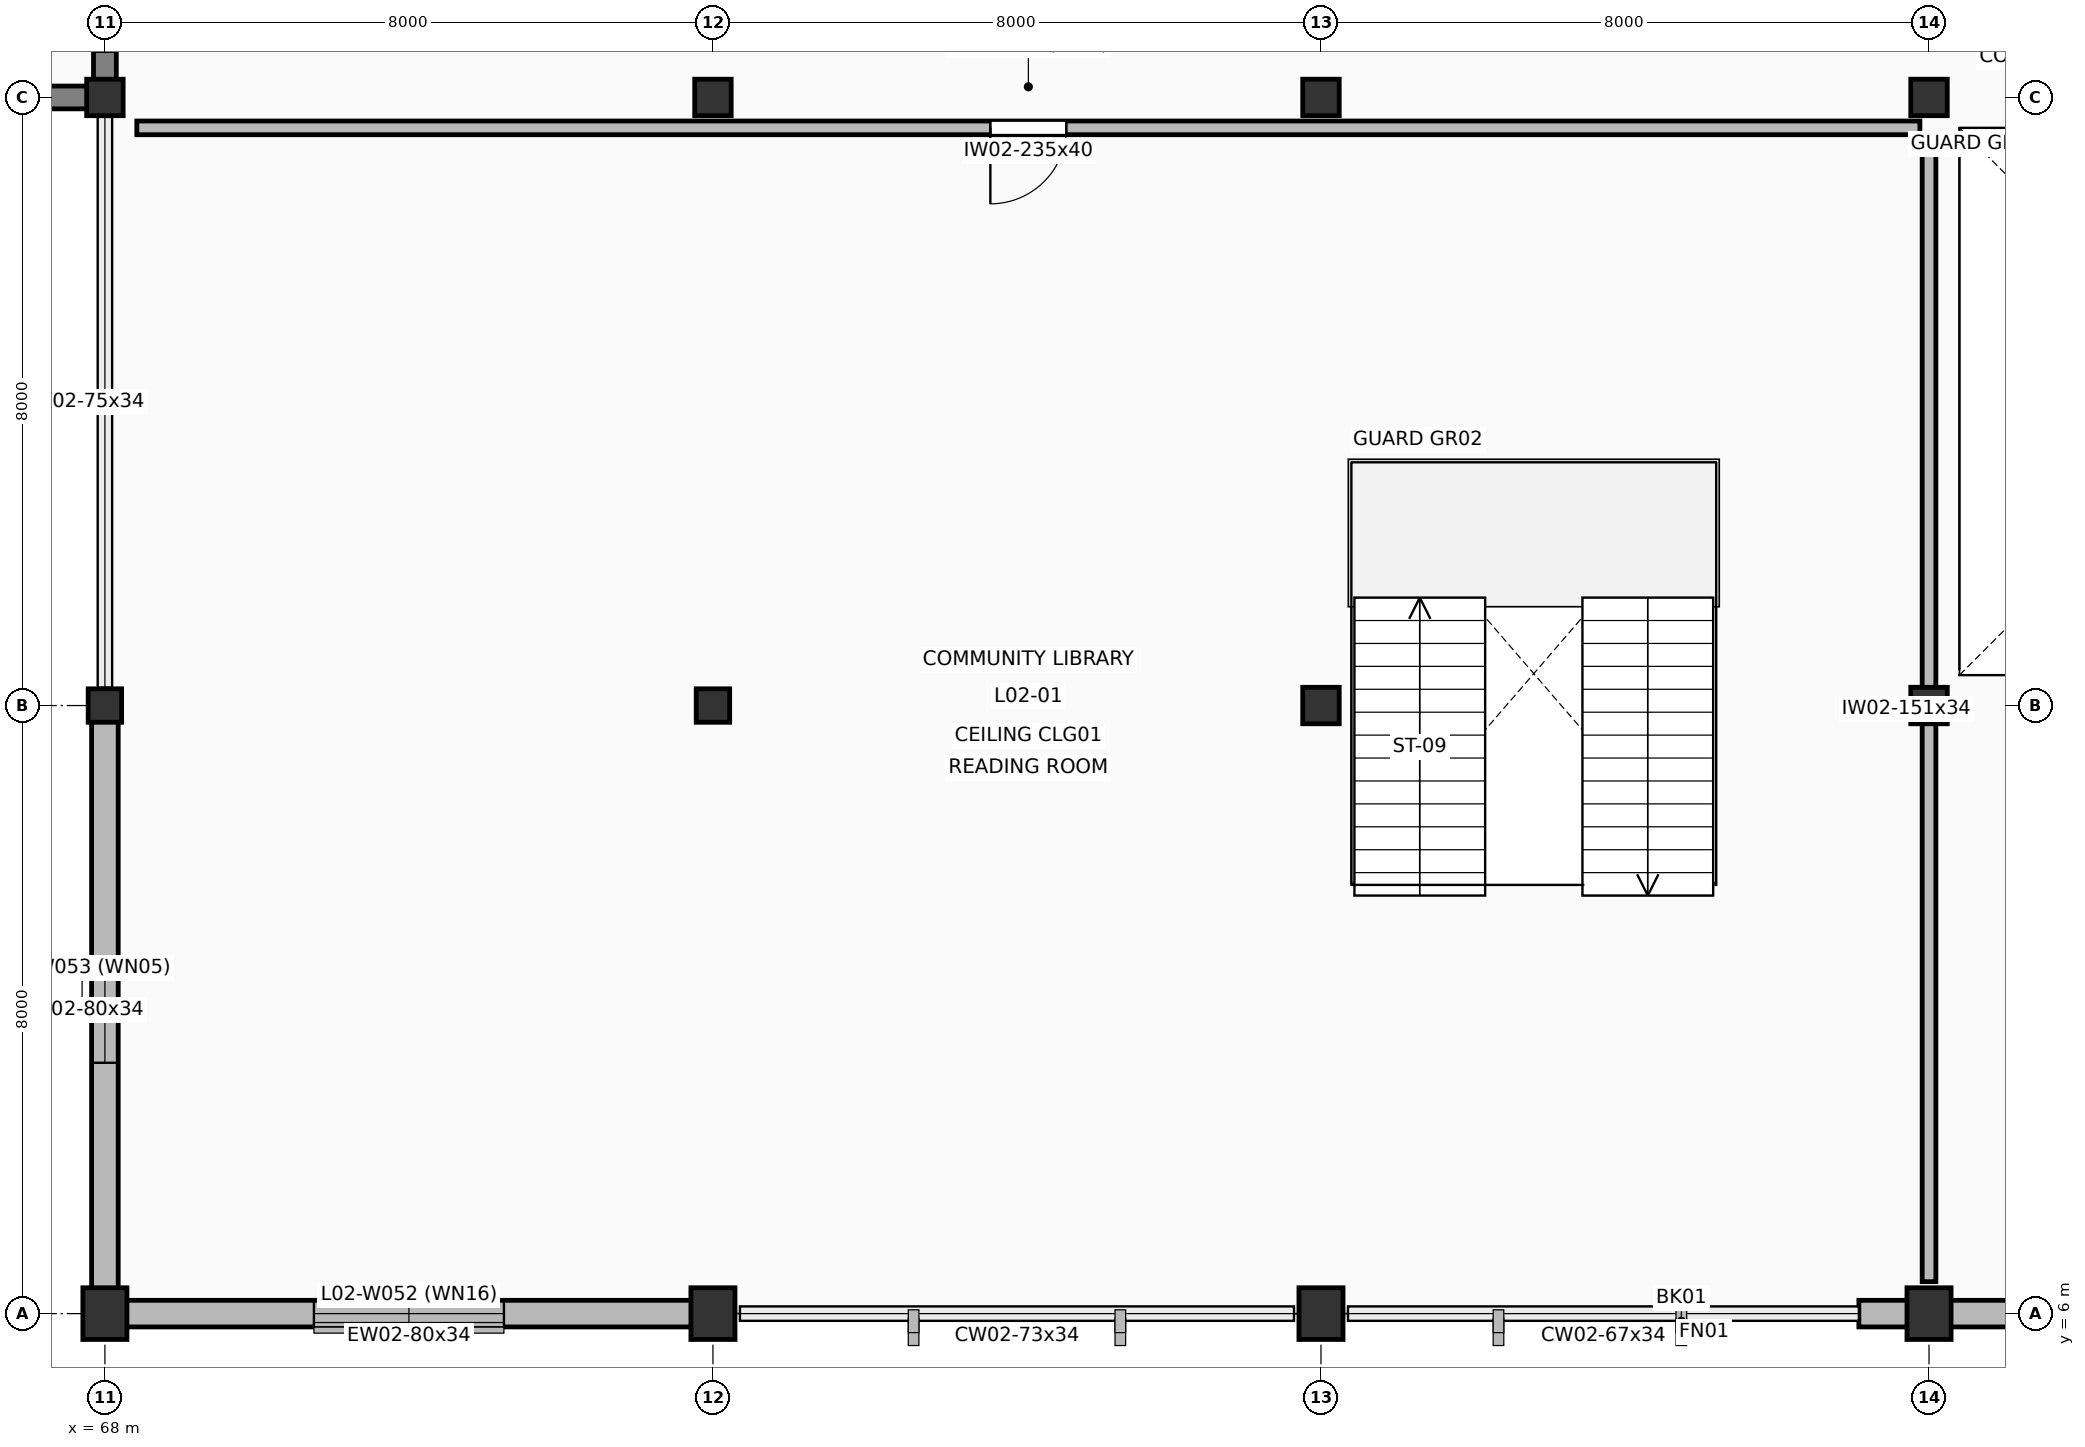
"""IFC4 building model, lengths in metres.
Left out: names, types, materials, properties, quantities, classifications, styles, units other than length and angle.
Written with IfcOpenShell. Run it as: python <this file> out.ifc"""

import sys

from ifc_helpers import new_model, si_unit, direction, frame, frame_2d, origin, origin_2d, place, context, subcontext, project, spatial, rectangle, extrude, element, fill, save


model = new_model("IFC4")
c1 = context("Model", 3, precision=1e-05, world=origin(), true_north=direction((0.0, 1.0)))
c2 = subcontext(c1, "Body", "Model", "MODEL_VIEW")
j1 = project(units=[si_unit("LENGTHUNIT", "METRE"), si_unit("PLANEANGLEUNIT", "RADIAN")], contexts=[c1])
p1 = place(None, origin())
s1 = spatial("IfcSite", under=j1, at=p1, CompositionType="ELEMENT")
p2 = place(p1, origin())
s2 = spatial("IfcBuilding", under=s1, at=p2, CompositionType="ELEMENT")
p3 = place(p2, frame((0.0, 0.0, 9.6)))
s3 = spatial("IfcBuildingStorey", under=s2, at=p3, CompositionType="ELEMENT", Elevation=9.6)
p4 = place(p3, frame((68.0, 6.0, 0.0), z_axis=(0.0, 0.0, 1.0), x_axis=(1.0, 0.0, 0.0)))
e1 = element("IfcColumn", 1, at=p4, inside=s3, PredefinedType="PILASTER", context=c2, shape_type="SweptSolid", body=[
    extrude(rectangle(XDim=0.58, YDim=0.68, at=origin_2d()), origin(), (0.0, 0.0, 1.0), 4.2),
])
p5 = place(p3, frame((68.0, 14.0, 0.0), z_axis=(0.0, 0.0, 1.0), x_axis=(1.0, 0.0, 0.0)))
e2 = element("IfcColumn", 2, at=p5, inside=s3, PredefinedType="COLUMN", context=c2, shape_type="SweptSolid", body=[
    extrude(rectangle(XDim=0.44, YDim=0.44, at=origin_2d()), origin(), (0.0, 0.0, 1.0), 4.2),
])
p6 = place(p3, frame((68.0, 22.0, 0.0), z_axis=(0.0, 0.0, 1.0), x_axis=(1.0, 0.0, 0.0)))
e3 = element("IfcColumn", 3, at=p6, inside=s3, PredefinedType="COLUMN", context=c2, shape_type="SweptSolid", body=[
    extrude(rectangle(XDim=0.48, YDim=0.48, at=origin_2d()), origin(), (0.0, 0.0, 1.0), 4.2),
])
p7 = place(p3, frame((76.0, 6.0, 0.0), z_axis=(0.0, 0.0, 1.0), x_axis=(1.0, 0.0, 0.0)))
e4 = element("IfcColumn", 4, at=p7, inside=s3, PredefinedType="PILASTER", context=c2, shape_type="SweptSolid", body=[
    extrude(rectangle(XDim=0.58, YDim=0.68, at=origin_2d()), origin(), (0.0, 0.0, 1.0), 4.2),
])
p8 = place(p3, frame((76.0, 14.0, 0.0), z_axis=(0.0, 0.0, 1.0), x_axis=(1.0, 0.0, 0.0)))
e5 = element("IfcColumn", 5, at=p8, inside=s3, PredefinedType="COLUMN", context=c2, shape_type="SweptSolid", body=[
    extrude(rectangle(XDim=0.44, YDim=0.44, at=origin_2d()), origin(), (0.0, 0.0, 1.0), 4.2),
])
p9 = place(p3, frame((76.0, 22.0, 0.0), z_axis=(0.0, 0.0, 1.0), x_axis=(1.0, 0.0, 0.0)))
e6 = element("IfcColumn", 6, at=p9, inside=s3, PredefinedType="COLUMN", context=c2, shape_type="SweptSolid", body=[
    extrude(rectangle(XDim=0.48, YDim=0.48, at=origin_2d()), origin(), (0.0, 0.0, 1.0), 4.2),
])
p10 = place(p3, frame((84.0, 6.0, 0.0), z_axis=(0.0, 0.0, 1.0), x_axis=(1.0, 0.0, 0.0)))
e7 = element("IfcColumn", 7, at=p10, inside=s3, PredefinedType="PILASTER", context=c2, shape_type="SweptSolid", body=[
    extrude(rectangle(XDim=0.58, YDim=0.68, at=origin_2d()), origin(), (0.0, 0.0, 1.0), 4.2),
])
for number, where, z_axis, x_axis in (
    (8, (84.0, 14.0, 0.0), (0.0, 0.0, 1.0), (1.0, 0.0, 0.0)),
    (9, (84.0, 22.0, 0.0), (0.0, 0.0, 1.0), (1.0, 0.0, 0.0)),
):
    element("IfcColumn", number, at=place(p3, frame(where, z_axis=z_axis, x_axis=x_axis)), inside=s3, PredefinedType="COLUMN", context=c2, shape_type="SweptSolid", body=[
        extrude(rectangle(XDim=0.48, YDim=0.48, at=origin_2d()), origin(), (0.0, 0.0, 1.0), 4.2),
    ])
p11 = place(p3, frame((92.0, 6.0, 0.0), z_axis=(0.0, 0.0, 1.0), x_axis=(1.0, 0.0, 0.0)))
e10 = element("IfcColumn", 10, at=p11, inside=s3, PredefinedType="PILASTER", context=c2, shape_type="SweptSolid", body=[
    extrude(rectangle(XDim=0.58, YDim=0.68, at=origin_2d()), origin(), (0.0, 0.0, 1.0), 4.2),
])
for number, where, z_axis, x_axis in (
    (11, (92.0, 14.0, 0.0), (0.0, 0.0, 1.0), (1.0, 0.0, 0.0)),
    (12, (92.0, 22.0, 0.0), (0.0, 0.0, 1.0), (1.0, 0.0, 0.0)),
):
    element("IfcColumn", number, at=place(p3, frame(where, z_axis=z_axis, x_axis=x_axis)), inside=s3, PredefinedType="COLUMN", context=c2, shape_type="SweptSolid", body=[
        extrude(rectangle(XDim=0.48, YDim=0.48, at=origin_2d()), origin(), (0.0, 0.0, 1.0), 4.2),
    ])
p12 = place(p3, frame((98.769, 6.0, 0.0), z_axis=(0.0, 0.0, 1.0), x_axis=(-1.0, 0.0, 0.0)))
e13 = element("IfcWall", 13, at=p12, inside=s3, PredefinedType="SOLIDWALL", context=c2, shape_type="SweptSolid", body=[
    extrude(rectangle(XDim=7.692, YDim=0.35, at=frame_2d((3.846, 0.0))), origin(), (0.0, 0.0, 1.0), 3.445),
])
p13 = place(p12, frame((2.896, 0.0, 0.9)))
e14 = element("IfcOpeningElement", 14, at=p13, cuts=e13, PredefinedType="OPENING", context=c2, shape_type="SweptSolid", body=[
    extrude(rectangle(XDim=1.9, YDim=2.1, at=frame_2d((0.95, 1.05))), frame((0.0, 0.185, 0.0), z_axis=(0.0, -1.0, 0.0), x_axis=(1.0, 0.0, 0.0)), (0.0, 0.0, 1.0), 0.37),
])
p14 = place(p3, frame((76.0, 6.0, 0.0), z_axis=(0.0, 0.0, 1.0), x_axis=(-1.0, 0.0, 0.0)))
e15 = element("IfcWall", 15, at=p14, inside=s3, PredefinedType="SOLIDWALL", context=c2, shape_type="SweptSolid", body=[
    extrude(rectangle(XDim=8.0, YDim=0.35, at=frame_2d((4.0, 0.0))), origin(), (0.0, 0.0, 1.0), 3.445),
])
p15 = place(p14, frame((2.75, 0.0, 1.6)))
e16 = element("IfcOpeningElement", 16, at=p15, cuts=e15, PredefinedType="OPENING", context=c2, shape_type="SweptSolid", body=[
    extrude(rectangle(XDim=2.5, YDim=1.3, at=frame_2d((1.25, 0.65))), frame((0.0, 0.185, 0.0), z_axis=(0.0, -1.0, 0.0), x_axis=(1.0, 0.0, 0.0)), (0.0, 0.0, 1.0), 0.37),
])
p16 = place(p3, frame((68.0, 6.0, 0.0), z_axis=(0.0, 0.0, 1.0), x_axis=(0.0, 1.0, 0.0)))
e17 = element("IfcWall", 17, at=p16, inside=s3, PredefinedType="SOLIDWALL", context=c2, shape_type="SweptSolid", body=[
    extrude(rectangle(XDim=8.0, YDim=0.35, at=frame_2d((4.0, 0.0))), origin(), (0.0, 0.0, 1.0), 3.365),
])
p17 = place(p16, frame((3.3, 0.0, 0.95)))
e18 = element("IfcOpeningElement", 18, at=p17, cuts=e17, PredefinedType="OPENING", context=c2, shape_type="SweptSolid", body=[
    extrude(rectangle(XDim=1.4, YDim=1.8, at=frame_2d((0.7, 0.9))), frame((0.0, 0.185, 0.0), z_axis=(0.0, -1.0, 0.0), x_axis=(1.0, 0.0, 0.0)), (0.0, 0.0, 1.0), 0.37),
])
p18 = place(p3, frame((68.0, 22.0, 0.0), z_axis=(0.0, 0.0, 1.0), x_axis=(-1.0, 0.0, 0.0)))
e19 = element("IfcWall", 19, at=p18, inside=s3, PredefinedType="SOLIDWALL", context=c2, shape_type="SweptSolid", body=[
    extrude(rectangle(XDim=8.0, YDim=0.3, at=frame_2d((4.0, 0.0))), origin(), (0.0, 0.0, 1.0), 4.2),
])
p19 = place(p3, frame((68.0, 30.0, 0.0), z_axis=(0.0, 0.0, 1.0), x_axis=(0.0, -1.0, 0.0)))
e20 = element("IfcWall", 20, at=p19, inside=s3, PredefinedType="SHEAR", context=c2, shape_type="SweptSolid", body=[
    extrude(rectangle(XDim=8.0, YDim=0.3, at=frame_2d((4.0, 0.0))), origin(), (0.0, 0.0, 1.0), 4.2),
])
p20 = place(p19, frame((6.3, 0.0, 0.0)))
e21 = element("IfcOpeningElement", 21, at=p20, cuts=e20, PredefinedType="OPENING", context=c2, shape_type="SweptSolid", body=[
    extrude(rectangle(XDim=1.1, YDim=2.2, at=frame_2d((0.55, 1.1))), frame((0.0, 0.16, 0.0), z_axis=(0.0, -1.0, 0.0), x_axis=(1.0, 0.0, 0.0)), (0.0, 0.0, 1.0), 0.32),
])
p21 = place(p19, frame((2.15, 0.0, 0.0)))
e22 = element("IfcOpeningElement", 22, at=p21, cuts=e20, PredefinedType="OPENING", context=c2, shape_type="SweptSolid", body=[
    extrude(rectangle(XDim=1.1, YDim=2.2, at=frame_2d((0.55, 1.1))), frame((0.0, 0.16, 0.0), z_axis=(0.0, -1.0, 0.0), x_axis=(1.0, 0.0, 0.0)), (0.0, 0.0, 1.0), 0.32),
])
p22 = place(p3, frame((91.88, 21.6, 0.0), z_axis=(0.0, 0.0, 1.0), x_axis=(-1.0, 0.0, 0.0)))
e23 = element("IfcWall", 23, at=p22, inside=s3, PredefinedType="PARTITIONING", context=c2, shape_type="SweptSolid", body=[
    extrude(rectangle(XDim=23.46, YDim=0.18, at=frame_2d((11.73, 0.0))), origin(), (0.0, 0.0, 1.0), 3.98),
])
p23 = place(p22, frame((11.23, 0.0, 0.0)))
e24 = element("IfcOpeningElement", 24, at=p23, cuts=e23, PredefinedType="OPENING", context=c2, shape_type="SweptSolid", body=[
    extrude(rectangle(XDim=1.0, YDim=2.15, at=frame_2d((0.5, 1.075))), frame((0.0, 0.1, 0.0), z_axis=(0.0, -1.0, 0.0), x_axis=(1.0, 0.0, 0.0)), (0.0, 0.0, 1.0), 0.2),
])
p24 = place(p3, frame((92.0, 6.42, 0.0), z_axis=(0.0, 0.0, 1.0), x_axis=(0.0, 1.0, 0.0)))
e25 = element("IfcWall", 25, at=p24, inside=s3, PredefinedType="PARTITIONING", context=c2, shape_type="SweptSolid", body=[
    extrude(rectangle(XDim=15.06, YDim=0.18, at=frame_2d((7.53, 0.0))), origin(), (0.0, 0.0, 1.0), 3.365),
])
p25 = place(p15, origin())
e26 = element("IfcWindow", 26, at=p25, inside=s3, PartitioningType="DOUBLE_PANEL_VERTICAL", PredefinedType="WINDOW", context=c2, shape_type="SweptSolid", body=[
    extrude(rectangle(XDim=2.5, YDim=1.3, at=frame_2d((1.25, 0.65))), frame((0.0, 0.03, 0.0), z_axis=(0.0, -1.0, 0.0), x_axis=(1.0, 0.0, 0.0)), (0.0, 0.0, 1.0), 0.06),
])
fill(e16, e26)
p26 = place(p17, origin())
e27 = element("IfcWindow", 27, at=p26, inside=s3, PartitioningType="SINGLE_PANEL", PredefinedType="WINDOW", context=c2, shape_type="SweptSolid", body=[
    extrude(rectangle(XDim=1.4, YDim=1.8, at=frame_2d((0.7, 0.9))), frame((0.0, 0.03, 0.0), z_axis=(0.0, -1.0, 0.0), x_axis=(1.0, 0.0, 0.0)), (0.0, 0.0, 1.0), 0.06),
])
fill(e18, e27)
p27 = place(p20, origin())
e28 = element("IfcDoor", 28, at=p27, inside=s3, OperationType="SINGLE_SWING_LEFT", PredefinedType="DOOR", context=c2, shape_type="SweptSolid", body=[
    extrude(rectangle(XDim=1.1, YDim=2.2, at=frame_2d((0.55, 1.1))), frame((0.0, 0.025, 0.0), z_axis=(0.0, -1.0, 0.0), x_axis=(1.0, 0.0, 0.0)), (0.0, 0.0, 1.0), 0.05),
])
fill(e21, e28)
p28 = place(p23, origin())
e29 = element("IfcDoor", 29, at=p28, inside=s3, OperationType="SINGLE_SWING_RIGHT", PredefinedType="DOOR", context=c2, shape_type="SweptSolid", body=[
    extrude(rectangle(XDim=1.0, YDim=2.15, at=frame_2d((0.5, 1.075))), frame((0.0, 0.025, 0.0), z_axis=(0.0, -1.0, 0.0), x_axis=(1.0, 0.0, 0.0)), (0.0, 0.0, 1.0), 0.05),
])
fill(e24, e29)
save(model, sys.argv[1])
